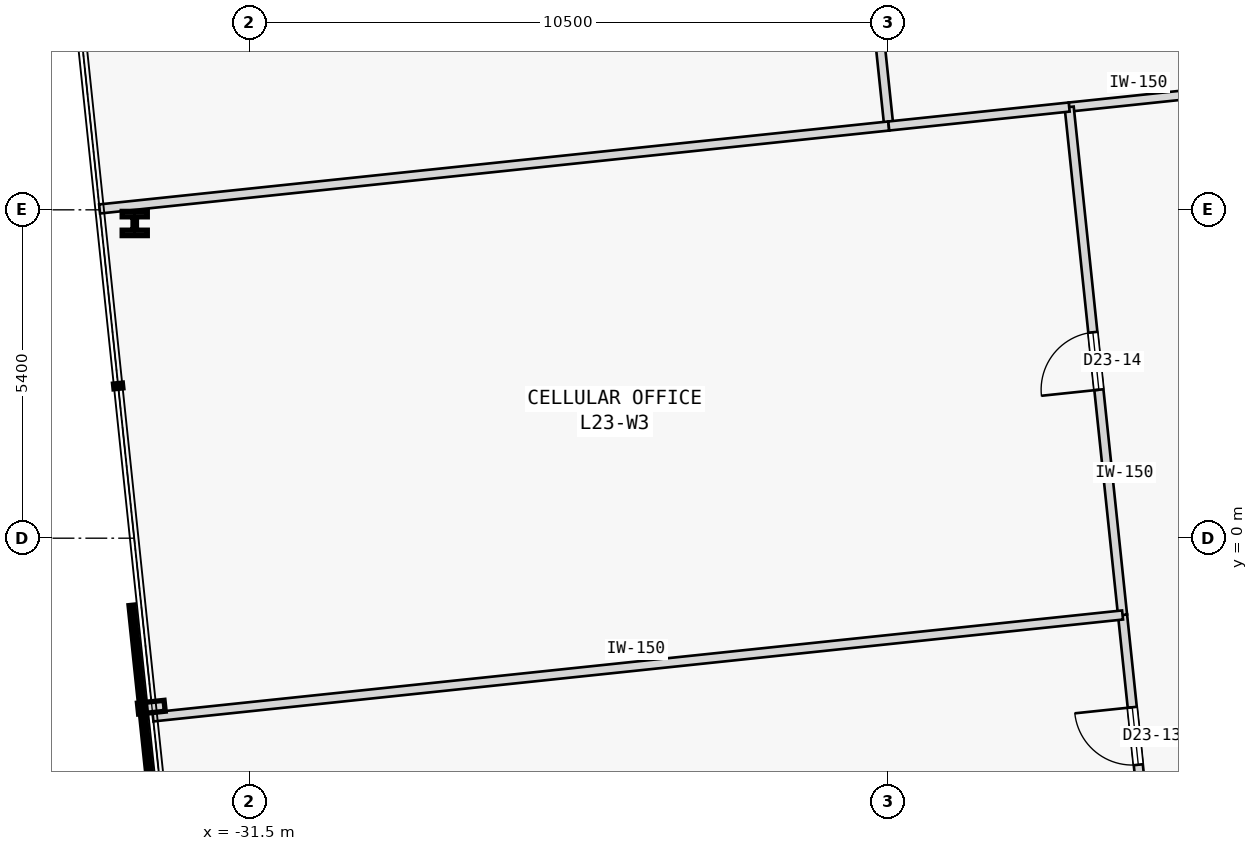
"""IFC4 building model, lengths in metres.
Left out: names, types, materials, properties, quantities, classifications, styles, units other than length and angle.
Written with IfcOpenShell. Run it as: python <this file> out.ifc"""

import sys

from ifc_helpers import new_model, si_unit, direction, frame, frame_2d, origin, origin_2d, place, context, subcontext, project, spatial, rectangle, i_section, extrude, element, fill, save


model = new_model("IFC4")
c1 = context("Model", 3, precision=1e-05, world=origin(), true_north=direction((0.0, 1.0)))
c2 = subcontext(c1, "Body", "Model", "MODEL_VIEW")
j1 = project(units=[si_unit("LENGTHUNIT", "METRE"), si_unit("PLANEANGLEUNIT", "RADIAN")], contexts=[c1])
p1 = place(None, origin())
s1 = spatial("IfcSite", under=j1, at=p1, CompositionType="ELEMENT")
p2 = place(p1, origin())
s2 = spatial("IfcBuilding", under=s1, at=p2, CompositionType="ELEMENT")
p3 = place(p2, frame((0.0, 0.0, 94.8)))
s3 = spatial("IfcBuildingStorey", under=s2, at=p3, CompositionType="ELEMENT", Elevation=94.8)
p4 = place(p3, frame((-33.388, 5.175, 0.0), z_axis=(0.0, 0.0, 1.0), x_axis=(1.0, 0.0, 0.0)))
e1 = element("IfcColumn", 1, at=p4, inside=s3, PredefinedType="COLUMN", context=c2, shape_type="SweptSolid", body=[
    extrude(i_section(OverallWidth=0.413, OverallDepth=0.398, WebThickness=0.056, FlangeThickness=0.089, FilletRadius=0.015, at=origin_2d()), origin(), (0.0, 0.0, 1.0), 3.7),
])
p5 = place(p3, frame((-18.021, 7.09, 0.0), z_axis=(0.0, 0.0, 1.0), x_axis=(0.994522183983, 0.104525717249, 0.0)))
e2 = element("IfcWall", 2, at=p5, inside=s3, PredefinedType="PARTITIONING", context=c2, shape_type="SweptSolid", body=[
    extrude(rectangle(XDim=10.067, YDim=0.15, at=frame_2d((5.033, 0.0))), origin(), (0.0, 0.0, 1.0), 3.475),
])
p6 = place(p5, frame((4.559, 0.0, 0.0)))
e3 = element("IfcOpeningElement", 3, at=p6, cuts=e2, PredefinedType="OPENING", context=c2, shape_type="SweptSolid", body=[
    extrude(rectangle(XDim=0.95, YDim=2.15, at=frame_2d((0.475, 1.075))), frame((0.0, 0.085, 0.0), z_axis=(0.0, -1.0, 0.0), x_axis=(1.0, 0.0, 0.0)), (0.0, 0.0, 1.0), 0.17),
])
p7 = place(p3, frame((-16.546, -6.949, 0.0), z_axis=(0.0, 0.0, 1.0), x_axis=(-0.104520314957, 0.994522751756, 0.0)))
e4 = element("IfcWall", 4, at=p7, inside=s3, PredefinedType="PARTITIONING", context=c2, shape_type="SweptSolid", body=[
    extrude(rectangle(XDim=5.718, YDim=0.15, at=frame_2d((2.859, 0.0))), origin(), (0.0, 0.0, 1.0), 3.475),
])
p8 = place(p7, frame((3.242, 0.0, 0.0)))
e5 = element("IfcOpeningElement", 5, at=p8, cuts=e4, PredefinedType="OPENING", context=c2, shape_type="SweptSolid", body=[
    extrude(rectangle(XDim=0.95, YDim=2.15, at=frame_2d((0.475, 1.075))), frame((0.0, 0.085, 0.0), z_axis=(0.0, -1.0, 0.0), x_axis=(1.0, 0.0, 0.0)), (0.0, 0.0, 1.0), 0.17),
])
p9 = place(p3, frame((-17.143, -1.263, 0.0), z_axis=(0.0, 0.0, 1.0), x_axis=(-0.104527419485, 0.994522005074, 0.0)))
e6 = element("IfcWall", 6, at=p9, inside=s3, PredefinedType="PARTITIONING", context=c2, shape_type="SweptSolid", body=[
    extrude(rectangle(XDim=8.399, YDim=0.15, at=frame_2d((4.199, 0.0))), origin(), (0.0, 0.0, 1.0), 3.475),
])
p10 = place(p9, frame((3.725, 0.0, 0.0)))
e7 = element("IfcOpeningElement", 7, at=p10, cuts=e6, PredefinedType="OPENING", context=c2, shape_type="SweptSolid", body=[
    extrude(rectangle(XDim=0.95, YDim=2.15, at=frame_2d((0.475, 1.075))), frame((0.0, 0.085, 0.0), z_axis=(0.0, -1.0, 0.0), x_axis=(1.0, 0.0, 0.0)), (0.0, 0.0, 1.0), 0.17),
])
p11 = place(p3, frame((-20.988, 6.779, 0.0), z_axis=(0.0, 0.0, 1.0), x_axis=(-0.104521364336, 0.99452264147, 0.0)))
e8 = element("IfcWall", 8, at=p11, inside=s3, PredefinedType="PARTITIONING", context=c2, shape_type="SweptSolid", body=[
    extrude(rectangle(XDim=16.409, YDim=0.15, at=frame_2d((8.205, 0.0))), origin(), (0.0, 0.0, 1.0), 3.475),
])
p12 = place(p11, frame((7.729, 0.0, 0.0)))
e9 = element("IfcOpeningElement", 9, at=p12, cuts=e8, PredefinedType="OPENING", context=c2, shape_type="SweptSolid", body=[
    extrude(rectangle(XDim=0.95, YDim=2.15, at=frame_2d((0.475, 1.075))), frame((0.0, 0.085, 0.0), z_axis=(0.0, -1.0, 0.0), x_axis=(1.0, 0.0, 0.0)), (0.0, 0.0, 1.0), 0.17),
])
p13 = place(p3, frame((-33.967, 5.414, 0.0), z_axis=(0.0, 0.0, 1.0), x_axis=(0.994520613947, 0.104540654453, 0.0)))
e10 = element("IfcWall", 10, at=p13, inside=s3, PredefinedType="PARTITIONING", context=c2, shape_type="SweptSolid", body=[
    extrude(rectangle(XDim=13.05, YDim=0.15, at=frame_2d((6.525, 0.0))), origin(), (0.0, 0.0, 1.0), 3.475),
])
p14 = place(p3, frame((-20.988, 6.779, 0.0), z_axis=(0.0, 0.0, 1.0), x_axis=(0.994523823632, 0.104510115436, 0.0)))
e11 = element("IfcWall", 11, at=p14, inside=s3, PredefinedType="PARTITIONING", context=c2, shape_type="SweptSolid", body=[
    extrude(rectangle(XDim=2.983, YDim=0.15, at=frame_2d((1.492, 0.0))), origin(), (0.0, 0.0, 1.0), 3.475),
])
p15 = place(p3, frame((-33.089, -2.939, 0.0), z_axis=(0.0, 0.0, 1.0), x_axis=(0.994521211213, 0.104534972363, 0.0)))
e12 = element("IfcWall", 12, at=p15, inside=s3, PredefinedType="PARTITIONING", context=c2, shape_type="SweptSolid", body=[
    extrude(rectangle(XDim=16.033, YDim=0.15, at=frame_2d((8.017, 0.0))), origin(), (0.0, 0.0, 1.0), 3.475),
])
p16 = place(p8, origin())
e13 = element("IfcDoor", 13, at=p16, inside=s3, OperationType="SINGLE_SWING_RIGHT", PredefinedType="DOOR", context=c2, shape_type="SweptSolid", body=[
    extrude(rectangle(XDim=0.95, YDim=2.15, at=frame_2d((0.475, 1.075))), frame((0.0, 0.025, 0.0), z_axis=(0.0, -1.0, 0.0), x_axis=(1.0, 0.0, 0.0)), (0.0, 0.0, 1.0), 0.05),
])
fill(e5, e13)
p17 = place(p10, origin())
e14 = element("IfcDoor", 14, at=p17, inside=s3, OperationType="SINGLE_SWING_LEFT", PredefinedType="DOOR", context=c2, shape_type="SweptSolid", body=[
    extrude(rectangle(XDim=0.95, YDim=2.15, at=frame_2d((0.475, 1.075))), frame((0.0, 0.025, 0.0), z_axis=(0.0, -1.0, 0.0), x_axis=(1.0, 0.0, 0.0)), (0.0, 0.0, 1.0), 0.05),
])
fill(e7, e14)
save(model, sys.argv[1])
